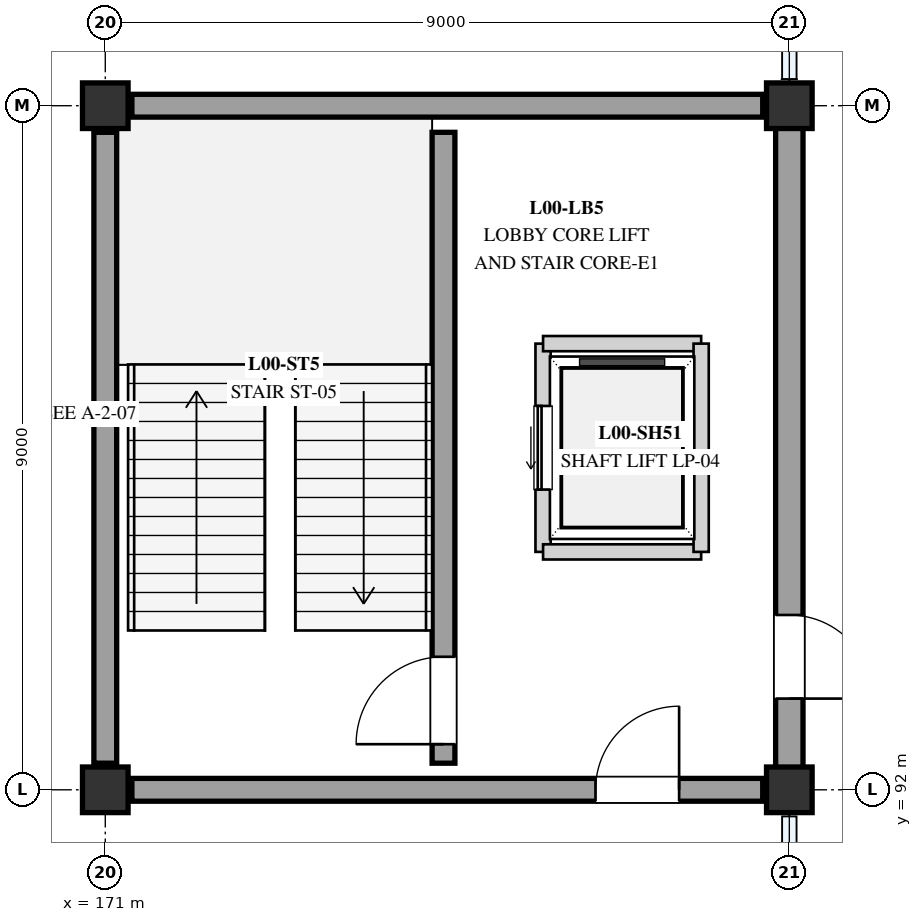
"""IFC4 building model, lengths in metres.
Left out: names, types, materials, properties, quantities, classifications, styles, units other than length and angle.
Written with IfcOpenShell. Run it as: python <this file> out.ifc"""

import sys

from ifc_helpers import new_model, si_unit, direction, frame, frame_2d, origin, origin_2d, place, context, subcontext, project, spatial, rectangle, extrude, element, fill, save


model = new_model("IFC4")
c1 = context("Model", 3, precision=1e-05, world=origin(), true_north=direction((0.0, 1.0)))
c2 = subcontext(c1, "Body", "Model", "MODEL_VIEW")
j1 = project(units=[si_unit("LENGTHUNIT", "METRE"), si_unit("PLANEANGLEUNIT", "RADIAN")], contexts=[c1])
p1 = place(None, origin())
s1 = spatial("IfcSite", under=j1, at=p1, CompositionType="ELEMENT")
p2 = place(p1, origin())
s2 = spatial("IfcBuilding", under=s1, at=p2, CompositionType="ELEMENT")
p3 = place(p2, origin())
s3 = spatial("IfcBuildingStorey", under=s2, at=p3, CompositionType="ELEMENT", Elevation=0.0)
for number, where, z_axis, x_axis in (
    (1, (171.0, 92.0, 0.0), (0.0, 0.0, 1.0), (1.0, 0.0, 0.0)),
    (2, (171.0, 101.0, 0.0), (0.0, 0.0, 1.0), (1.0, 0.0, 0.0)),
    (3, (180.0, 92.0, 0.0), (0.0, 0.0, 1.0), (1.0, 0.0, 0.0)),
    (4, (180.0, 101.0, 0.0), (0.0, 0.0, 1.0), (1.0, 0.0, 0.0)),
):
    element("IfcColumn", number, at=place(p3, frame(where, z_axis=z_axis, x_axis=x_axis)), inside=s3, PredefinedType="COLUMN", context=c2, shape_type="SweptSolid", body=[
        extrude(rectangle(XDim=0.6, YDim=0.6, at=origin_2d()), origin(), (0.0, 0.0, 1.0), 4.5),
    ])
p4 = place(p3, frame((180.0, 101.0, 0.0), z_axis=(0.0, 0.0, 1.0), x_axis=(0.0, -1.0, 0.0)))
e5 = element("IfcWall", 5, at=p4, inside=s3, PredefinedType="STANDARD", context=c2, shape_type="SweptSolid", body=[
    extrude(rectangle(XDim=9.0, YDim=0.36, at=frame_2d((4.5, 0.0))), origin(), (0.0, 0.0, 1.0), 4.23),
])
p5 = place(p4, frame((6.7, 0.0, 0.0)))
e6 = element("IfcOpeningElement", 6, at=p5, cuts=e5, PredefinedType="OPENING", context=c2, shape_type="SweptSolid", body=[
    extrude(rectangle(XDim=1.1, YDim=2.2, at=frame_2d((0.55, 1.1))), frame((0.0, 0.19, 0.0), z_axis=(0.0, -1.0, 0.0), x_axis=(1.0, 0.0, 0.0)), (0.0, 0.0, 1.0), 0.38),
])
p6 = place(p3, frame((175.45, 92.35, 0.0), z_axis=(0.0, 0.0, 1.0), x_axis=(0.0, 1.0, 0.0)))
e7 = element("IfcWall", 7, at=p6, inside=s3, PredefinedType="SHEAR", context=c2, shape_type="SweptSolid", body=[
    extrude(rectangle(XDim=8.3, YDim=0.3, at=frame_2d((4.15, 0.0))), origin(), (0.0, 0.0, 1.0), 4.22),
])
p7 = place(p6, frame((0.25, 0.0, 0.0)))
e8 = element("IfcOpeningElement", 8, at=p7, cuts=e7, PredefinedType="OPENING", context=c2, shape_type="SweptSolid", body=[
    extrude(rectangle(XDim=1.15, YDim=2.15, at=frame_2d((0.575, 1.075))), frame((0.0, 0.16, 0.0), z_axis=(0.0, -1.0, 0.0), x_axis=(1.0, 0.0, 0.0)), (0.0, 0.0, 1.0), 0.32),
])
p8 = place(p3, frame((171.0, 92.35, 0.0), z_axis=(0.0, 0.0, 1.0), x_axis=(0.0, 1.0, 0.0)))
e9 = element("IfcWall", 9, at=p8, inside=s3, PredefinedType="SHEAR", context=c2, shape_type="SweptSolid", body=[
    extrude(rectangle(XDim=8.3, YDim=0.3, at=frame_2d((4.15, 0.0))), origin(), (0.0, 0.0, 1.0), 4.22),
])
p9 = place(p3, frame((171.35, 92.0, 0.0), z_axis=(0.0, 0.0, 1.0), x_axis=(1.0, 0.0, 0.0)))
e10 = element("IfcWall", 10, at=p9, inside=s3, PredefinedType="SHEAR", context=c2, shape_type="SweptSolid", body=[
    extrude(rectangle(XDim=8.3, YDim=0.3, at=frame_2d((4.15, 0.0))), origin(), (0.0, 0.0, 1.0), 4.22),
])
p10 = place(p9, frame((6.1, 0.0, 0.0)))
e11 = element("IfcOpeningElement", 11, at=p10, cuts=e10, PredefinedType="OPENING", context=c2, shape_type="SweptSolid", body=[
    extrude(rectangle(XDim=1.1, YDim=2.1, at=frame_2d((0.55, 1.05))), frame((0.0, 0.16, 0.0), z_axis=(0.0, -1.0, 0.0), x_axis=(1.0, 0.0, 0.0)), (0.0, 0.0, 1.0), 0.32),
])
p11 = place(p3, frame((171.35, 101.0, 0.0), z_axis=(0.0, 0.0, 1.0), x_axis=(1.0, 0.0, 0.0)))
e12 = element("IfcWall", 12, at=p11, inside=s3, PredefinedType="SHEAR", context=c2, shape_type="SweptSolid", body=[
    extrude(rectangle(XDim=8.3, YDim=0.3, at=frame_2d((4.15, 0.0))), origin(), (0.0, 0.0, 1.0), 4.22),
])
p12 = place(p3, frame((176.76, 95.13, 0.0), z_axis=(0.0, 0.0, 1.0), x_axis=(0.0, 1.0, 0.0)))
e13 = element("IfcWall", 13, at=p12, inside=s3, PredefinedType="SOLIDWALL", context=c2, shape_type="SweptSolid", body=[
    extrude(rectangle(XDim=2.74, YDim=0.2, at=frame_2d((1.37, 0.0))), origin(), (0.0, 0.0, 1.0), 3.2),
])
p13 = place(p12, frame((0.82, 0.0, 0.0)))
e14 = element("IfcOpeningElement", 14, at=p13, cuts=e13, PredefinedType="OPENING", context=c2, shape_type="SweptSolid", body=[
    extrude(rectangle(XDim=1.1, YDim=2.1, at=frame_2d((0.55, 1.05))), frame((0.0, 0.11, 0.0), z_axis=(0.0, -1.0, 0.0), x_axis=(1.0, 0.0, 0.0)), (0.0, 0.0, 1.0), 0.22),
])
for number, where, z_axis, x_axis in (
    (15, (176.76, 95.13, 0.0), (0.0, 0.0, 1.0), (1.0, 0.0, 0.0)),
    (16, (176.76, 97.87, 0.0), (0.0, 0.0, 1.0), (1.0, 0.0, 0.0)),
):
    element("IfcWall", number, at=place(p3, frame(where, z_axis=z_axis, x_axis=x_axis)), inside=s3, PredefinedType="SOLIDWALL", context=c2, shape_type="SweptSolid", body=[
        extrude(rectangle(XDim=2.08, YDim=0.2, at=frame_2d((1.04, 0.0))), origin(), (0.0, 0.0, 1.0), 3.2),
    ])
p14 = place(p3, frame((178.84, 95.13, 0.0), z_axis=(0.0, 0.0, 1.0), x_axis=(0.0, 1.0, 0.0)))
e17 = element("IfcWall", 17, at=p14, inside=s3, PredefinedType="SOLIDWALL", context=c2, shape_type="SweptSolid", body=[
    extrude(rectangle(XDim=2.74, YDim=0.2, at=frame_2d((1.37, 0.0))), origin(), (0.0, 0.0, 1.0), 3.2),
])
p15 = place(p5, origin())
e18 = element("IfcDoor", 18, at=p15, inside=s3, OperationType="SINGLE_SWING_RIGHT", PredefinedType="DOOR", context=c2, shape_type="SweptSolid", body=[
    extrude(rectangle(XDim=1.1, YDim=2.2, at=frame_2d((0.55, 1.1))), frame((0.0, 0.025, 0.0), z_axis=(0.0, -1.0, 0.0), x_axis=(1.0, 0.0, 0.0)), (0.0, 0.0, 1.0), 0.05),
])
fill(e6, e18)
p16 = place(p7, origin())
e19 = element("IfcDoor", 19, at=p16, inside=s3, OperationType="SINGLE_SWING_LEFT", PredefinedType="DOOR", context=c2, shape_type="SweptSolid", body=[
    extrude(rectangle(XDim=1.15, YDim=2.15, at=frame_2d((0.575, 1.075))), frame((0.0, 0.025, 0.0), z_axis=(0.0, -1.0, 0.0), x_axis=(1.0, 0.0, 0.0)), (0.0, 0.0, 1.0), 0.05),
])
fill(e8, e19)
p17 = place(p10, origin())
e20 = element("IfcDoor", 20, at=p17, inside=s3, OperationType="SINGLE_SWING_RIGHT", PredefinedType="DOOR", context=c2, shape_type="SweptSolid", body=[
    extrude(rectangle(XDim=1.1, YDim=2.1, at=frame_2d((0.55, 1.05))), frame((0.0, 0.025, 0.0), z_axis=(0.0, -1.0, 0.0), x_axis=(1.0, 0.0, 0.0)), (0.0, 0.0, 1.0), 0.05),
])
fill(e11, e20)
p18 = place(p13, origin())
e21 = element("IfcDoor", 21, at=p18, inside=s3, OperationType="SLIDING_TO_LEFT", PredefinedType="DOOR", context=c2, shape_type="SweptSolid", body=[
    extrude(rectangle(XDim=1.1, YDim=2.1, at=frame_2d((0.55, 1.05))), frame((0.0, 0.025, 0.0), z_axis=(0.0, -1.0, 0.0), x_axis=(1.0, 0.0, 0.0)), (0.0, 0.0, 1.0), 0.05),
])
fill(e14, e21)
save(model, sys.argv[1])
